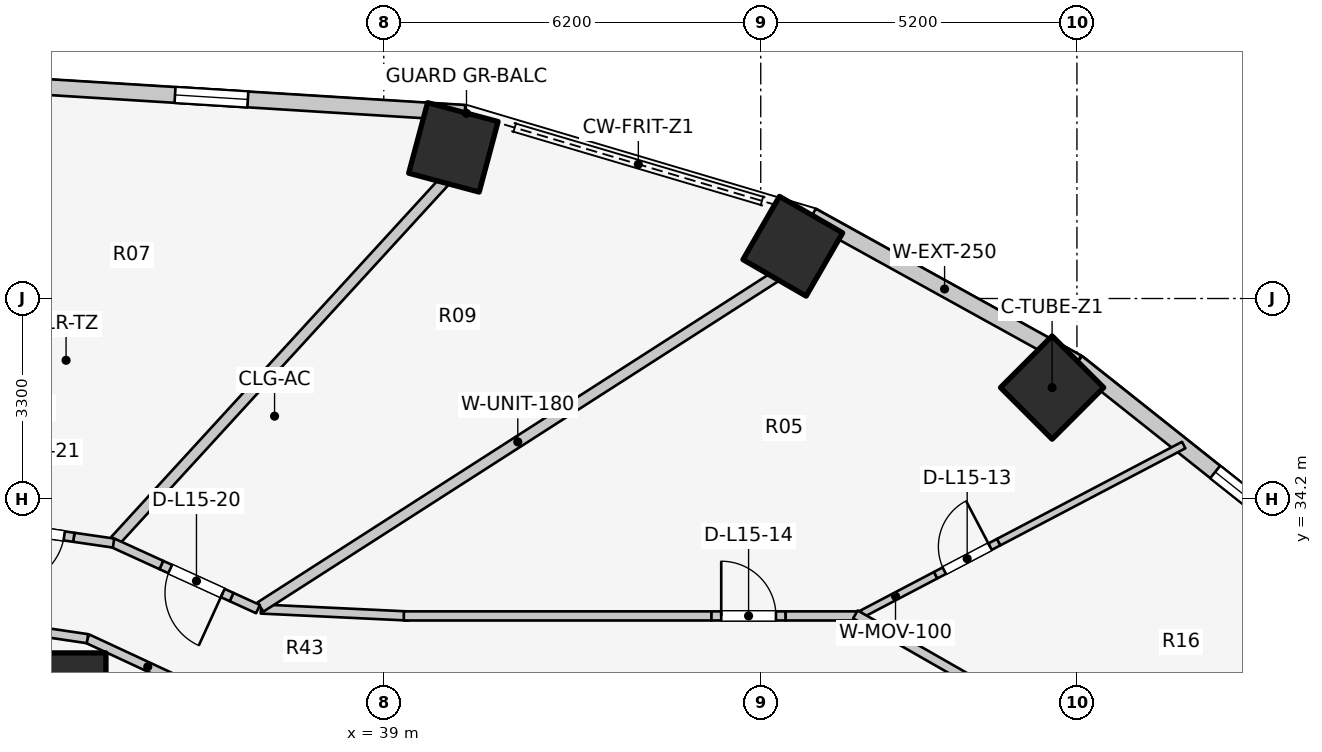
"""IFC4 building model, lengths in metres.
Left out: names, types, materials, properties, quantities, classifications, styles, units other than length and angle.
Written with IfcOpenShell. Run it as: python <this file> out.ifc"""

import sys

from ifc_helpers import new_model, si_unit, direction, frame, frame_2d, origin, origin_2d, place, context, subcontext, project, spatial, rectangle, extrude, element, fill, save


model = new_model("IFC4")
c1 = context("Model", 3, precision=1e-05, world=origin(), true_north=direction((0.0, 1.0)))
c2 = subcontext(c1, "Body", "Model", "MODEL_VIEW")
j1 = project(units=[si_unit("LENGTHUNIT", "METRE"), si_unit("PLANEANGLEUNIT", "RADIAN")], contexts=[c1])
p1 = place(None, origin())
s1 = spatial("IfcSite", under=j1, at=p1, CompositionType="ELEMENT")
p2 = place(p1, origin())
s2 = spatial("IfcBuilding", under=s1, at=p2, CompositionType="ELEMENT")
p3 = place(p2, frame((0.0, 0.0, 52.4)))
s3 = spatial("IfcBuildingStorey", under=s2, at=p3, CompositionType="ELEMENT", Elevation=52.4)
for number, where, z_axis, x_axis in (
    (1, (49.992, 36.035, 0.0), (0.0, 0.0, 1.0), (0.707, 0.707, 0.0)),
    (2, (45.727, 38.359, 0.0), (0.0, 0.0, 1.0), (0.5, 0.866, 0.0)),
):
    element("IfcColumn", number, at=place(p3, frame(where, z_axis=z_axis, x_axis=x_axis)), inside=s3, PredefinedType="COLUMN", context=c2, shape_type="SweptSolid", body=[
        extrude(rectangle(XDim=1.2, YDim=1.2, at=origin_2d()), origin(), (0.0, 0.0, 1.0), 3.1),
    ])
p4 = place(p3, frame((33.931, 31.172, 0.0), z_axis=(0.0, 0.0, 1.0), x_axis=(1.0, 0.0, 0.0)))
e3 = element("IfcColumn", 3, at=p4, inside=s3, PredefinedType="COLUMN", context=c2, shape_type="SweptSolid", body=[
    extrude(rectangle(XDim=1.0, YDim=1.0, at=origin_2d()), origin(), (0.0, 0.0, 1.0), 3.1),
])
p5 = place(p3, frame((40.145, 39.986, 0.0), z_axis=(0.0, 0.0, 1.0), x_axis=(0.258819045103, 0.965925826289, 0.0)))
e4 = element("IfcColumn", 4, at=p5, inside=s3, PredefinedType="COLUMN", context=c2, shape_type="SweptSolid", body=[
    extrude(rectangle(XDim=1.2, YDim=1.2, at=origin_2d()), origin(), (0.0, 0.0, 1.0), 3.1),
])
p6 = place(p3, frame((54.194, 33.441, 0.0), z_axis=(0.0, 0.0, 1.0), x_axis=(-0.783123133379, 0.621866672179, 0.0)))
e5 = element("IfcWall", 5, at=p6, inside=s3, PredefinedType="STANDARD", context=c2, shape_type="SweptSolid", body=[
    extrude(rectangle(XDim=4.839, YDim=0.26, at=frame_2d((2.419, 0.0))), origin(), (0.0, 0.0, 1.0), 1.22),
])
p7 = place(p6, frame((0.741, 0.0, 0.15)))
e6 = element("IfcOpeningElement", 6, at=p7, cuts=e5, PredefinedType="OPENING", context=c2, shape_type="SweptSolid", body=[
    extrude(rectangle(XDim=1.2, YDim=0.9, at=frame_2d((0.6, 0.45))), frame((0.0, 0.14, 0.0), z_axis=(0.0, -1.0, 0.0), x_axis=(1.0, 0.0, 0.0)), (0.0, 0.0, 1.0), 0.28),
])
p8 = place(p3, frame((50.405, 36.45, 0.0), z_axis=(0.0, 0.0, 1.0), x_axis=(-0.875137303239, 0.483874674352, 0.0)))
e7 = element("IfcWall", 7, at=p8, inside=s3, PredefinedType="STANDARD", context=c2, shape_type="SweptSolid", body=[
    extrude(rectangle(XDim=4.985, YDim=0.26, at=frame_2d((2.493, 0.0))), origin(), (0.0, 0.0, 1.0), 1.22),
])
p9 = place(p3, frame((40.332, 40.553, 0.0), z_axis=(0.0, 0.0, 1.0), x_axis=(-0.998090514779, 0.061768311519, 0.0)))
e8 = element("IfcWall", 8, at=p9, inside=s3, PredefinedType="STANDARD", context=c2, shape_type="SweptSolid", body=[
    extrude(rectangle(XDim=8.348, YDim=0.26, at=frame_2d((4.174, 0.0))), origin(), (0.0, 0.0, 1.0), 1.22),
])
p10 = place(p9, frame((3.574, 0.0, 0.15)))
e9 = element("IfcOpeningElement", 9, at=p10, cuts=e8, PredefinedType="OPENING", context=c2, shape_type="SweptSolid", body=[
    extrude(rectangle(XDim=1.2, YDim=0.9, at=frame_2d((0.6, 0.45))), frame((0.0, 0.14, 0.0), z_axis=(0.0, -1.0, 0.0), x_axis=(1.0, 0.0, 0.0)), (0.0, 0.0, 1.0), 0.28),
])
p11 = place(p3, frame((36.11, 30.985, 0.0), z_axis=(0.0, 0.0, 1.0), x_axis=(-0.906943449489, 0.421252393975, 0.0)))
e10 = element("IfcWall", 10, at=p11, inside=s3, PredefinedType="PARTITIONING", context=c2, shape_type="SweptSolid", body=[
    extrude(rectangle(XDim=2.186, YDim=0.15, at=frame_2d((1.093, 0.0))), origin(), (0.0, 0.0, 1.0), 1.957),
])
p12 = place(p3, frame((34.127, 31.906, 0.0), z_axis=(0.0, 0.0, 1.0), x_axis=(-0.989268584896, 0.146108408166, 0.0)))
e11 = element("IfcWall", 11, at=p12, inside=s3, PredefinedType="PARTITIONING", context=c2, shape_type="SweptSolid", body=[
    extrude(rectangle(XDim=2.151, YDim=0.15, at=frame_2d((1.075, 0.0))), origin(), (0.0, 0.0, 1.0), 1.957),
])
p13 = place(p3, frame((46.756, 32.257, 0.0), z_axis=(0.0, 0.0, 1.0), x_axis=(0.885552742751, 0.464538846391, 0.0)))
e12 = element("IfcWall", 12, at=p13, inside=s3, PredefinedType="MOVABLE", context=c2, shape_type="SweptSolid", body=[
    extrude(rectangle(XDim=1.492, YDim=0.12, at=frame_2d((0.746, 0.0))), origin(), (0.0, 0.0, 1.0), 2.575),
])
p14 = place(p3, frame((48.077, 32.95, 0.0), z_axis=(0.0, 0.0, 1.0), x_axis=(0.885533150024, 0.464576194191, 0.0)))
e13 = element("IfcWall", 13, at=p14, inside=s3, PredefinedType="MOVABLE", context=c2, shape_type="SweptSolid", body=[
    extrude(rectangle(XDim=1.17, YDim=0.12, at=frame_2d((0.585, 0.0))), origin(), (0.0, 0.0, 1.0), 2.11),
])
p15 = place(p14, frame((0.16, 0.0, 0.0)))
e14 = element("IfcOpeningElement", 14, at=p15, cuts=e13, PredefinedType="OPENING", context=c2, shape_type="SweptSolid", body=[
    extrude(rectangle(XDim=0.85, YDim=2.05, at=frame_2d((0.425, 1.025))), frame((0.0, 0.07, 0.0), z_axis=(0.0, -1.0, 0.0), x_axis=(1.0, 0.0, 0.0)), (0.0, 0.0, 1.0), 0.14),
])
p16 = place(p3, frame((49.113, 33.493, 0.0), z_axis=(0.0, 0.0, 1.0), x_axis=(0.885561599533, 0.464521962271, 0.0)))
e15 = element("IfcWall", 15, at=p16, inside=s3, PredefinedType="MOVABLE", context=c2, shape_type="SweptSolid", body=[
    extrude(rectangle(XDim=3.436, YDim=0.12, at=frame_2d((1.718, 0.0))), origin(), (0.0, 0.0, 1.0), 1.22),
])
p17 = place(p3, frame((36.98, 32.394, 0.0), z_axis=(0.0, 0.0, 1.0), x_axis=(0.998877427952, -0.047369651964, 0.0)))
e16 = element("IfcWall", 16, at=p17, inside=s3, PredefinedType="PARTITIONING", context=c2, shape_type="SweptSolid", body=[
    extrude(rectangle(XDim=2.433, YDim=0.15, at=frame_2d((1.216, 0.0))), origin(), (0.0, 0.0, 1.0), 1.957),
])
p18 = place(p3, frame((39.33, 32.28, 0.0), z_axis=(0.0, 0.0, 1.0), x_axis=(1.0, 0.0, 0.0)))
e17 = element("IfcWall", 17, at=p18, inside=s3, PredefinedType="PARTITIONING", context=c2, shape_type="SweptSolid", body=[
    extrude(rectangle(XDim=5.06, YDim=0.15, at=frame_2d((2.53, 0.0))), origin(), (0.0, 0.0, 1.0), 1.957),
])
p19 = place(p3, frame((44.39, 32.28, 0.0), z_axis=(0.0, 0.0, 1.0), x_axis=(1.0, 0.0, 0.0)))
e18 = element("IfcWall", 18, at=p19, inside=s3, PredefinedType="PARTITIONING", context=c2, shape_type="SweptSolid", body=[
    extrude(rectangle(XDim=1.22, YDim=0.15, at=frame_2d((0.61, 0.0))), origin(), (0.0, 0.0, 1.0), 2.575),
])
p20 = place(p19, frame((0.16, 0.0, 0.0)))
e19 = element("IfcOpeningElement", 19, at=p20, cuts=e18, PredefinedType="OPENING", context=c2, shape_type="SweptSolid", body=[
    extrude(rectangle(XDim=0.9, YDim=2.1, at=frame_2d((0.45, 1.05))), frame((0.0, 0.085, 0.0), z_axis=(0.0, -1.0, 0.0), x_axis=(1.0, 0.0, 0.0)), (0.0, 0.0, 1.0), 0.17),
])
p21 = place(p3, frame((45.61, 32.28, 0.0), z_axis=(0.0, 0.0, 1.0), x_axis=(1.0, 0.0, 0.0)))
e20 = element("IfcWall", 20, at=p21, inside=s3, PredefinedType="PARTITIONING", context=c2, shape_type="SweptSolid", body=[
    extrude(rectangle(XDim=1.24, YDim=0.15, at=frame_2d((0.62, 0.0))), origin(), (0.0, 0.0, 1.0), 2.575),
])
p22 = place(p3, frame((46.757, 32.305, 0.0), z_axis=(0.0, 0.0, 1.0), x_axis=(0.867991349648, -0.496579315857, 0.0)))
e21 = element("IfcWall", 21, at=p22, inside=s3, PredefinedType="PARTITIONING", context=c2, shape_type="SweptSolid", body=[
    extrude(rectangle(XDim=2.567, YDim=0.15, at=frame_2d((1.283, 0.0))), origin(), (0.0, 0.0, 1.0), 1.22),
])
p23 = place(p3, frame((36.971, 32.426, 0.0), z_axis=(0.0, 0.0, 1.0), x_axis=(0.841689919529, 0.5399611832, 0.0)))
e22 = element("IfcWall", 22, at=p23, inside=s3, PredefinedType="PARTITIONING", context=c2, shape_type="SweptSolid", body=[
    extrude(rectangle(XDim=10.058, YDim=0.18, at=frame_2d((5.029, 0.0))), origin(), (0.0, 0.0, 1.0), 1.957),
])
p24 = place(p3, frame((34.586, 33.521, 0.0), z_axis=(0.0, 0.0, 1.0), x_axis=(0.675465011224, 0.737392038615, 0.0)))
e23 = element("IfcWall", 23, at=p24, inside=s3, PredefinedType="PARTITIONING", context=c2, shape_type="SweptSolid", body=[
    extrude(rectangle(XDim=8.007, YDim=0.18, at=frame_2d((4.003, 0.0))), origin(), (0.0, 0.0, 1.0), 1.957),
])
p25 = place(p3, frame((36.931, 32.393, 0.0), z_axis=(0.0, 0.0, 1.0), x_axis=(-0.909645934478, 0.415384489224, 0.0)))
e24 = element("IfcWall", 24, at=p25, inside=s3, PredefinedType="PARTITIONING", context=c2, shape_type="SweptSolid", body=[
    extrude(rectangle(XDim=0.477, YDim=0.15, at=frame_2d((0.238, 0.0))), origin(), (0.0, 0.0, 1.0), 2.575),
])
p26 = place(p3, frame((36.497, 32.591, 0.0), z_axis=(0.0, 0.0, 1.0), x_axis=(-0.909812681416, 0.415019137794, 0.0)))
e25 = element("IfcWall", 25, at=p26, inside=s3, PredefinedType="PARTITIONING", context=c2, shape_type="SweptSolid", body=[
    extrude(rectangle(XDim=1.27, YDim=0.15, at=frame_2d((0.635, 0.0))), origin(), (0.0, 0.0, 1.0), 2.16),
])
p27 = place(p26, frame((0.16, 0.0, 0.0)))
e26 = element("IfcOpeningElement", 26, at=p27, cuts=e25, PredefinedType="OPENING", context=c2, shape_type="SweptSolid", body=[
    extrude(rectangle(XDim=0.95, YDim=2.1, at=frame_2d((0.475, 1.05))), frame((0.0, 0.085, 0.0), z_axis=(0.0, -1.0, 0.0), x_axis=(1.0, 0.0, 0.0)), (0.0, 0.0, 1.0), 0.17),
])
p28 = place(p3, frame((35.342, 33.118, 0.0), z_axis=(0.0, 0.0, 1.0), x_axis=(-0.909708546861, 0.415247347696, 0.0)))
e27 = element("IfcWall", 27, at=p28, inside=s3, PredefinedType="PARTITIONING", context=c2, shape_type="SweptSolid", body=[
    extrude(rectangle(XDim=0.878, YDim=0.15, at=frame_2d((0.439, 0.0))), origin(), (0.0, 0.0, 1.0), 1.957),
])
p29 = place(p3, frame((34.556, 33.478, 0.0), z_axis=(0.0, 0.0, 1.0), x_axis=(-0.989643848527, 0.143544603076, 0.0)))
e28 = element("IfcWall", 28, at=p29, inside=s3, PredefinedType="PARTITIONING", context=c2, shape_type="SweptSolid", body=[
    extrude(rectangle(XDim=0.66, YDim=0.15, at=frame_2d((0.33, 0.0))), origin(), (0.0, 0.0, 1.0), 2.575),
])
p30 = place(p3, frame((33.903, 33.573, 0.0), z_axis=(0.0, 0.0, 1.0), x_axis=(-0.989635669595, 0.143600980029, 0.0)))
e29 = element("IfcWall", 29, at=p30, inside=s3, PredefinedType="PARTITIONING", context=c2, shape_type="SweptSolid", body=[
    extrude(rectangle(XDim=1.27, YDim=0.15, at=frame_2d((0.635, 0.0))), origin(), (0.0, 0.0, 1.0), 2.575),
])
p31 = place(p30, frame((0.16, 0.0, 0.0)))
e30 = element("IfcOpeningElement", 30, at=p31, cuts=e29, PredefinedType="OPENING", context=c2, shape_type="SweptSolid", body=[
    extrude(rectangle(XDim=0.95, YDim=2.1, at=frame_2d((0.475, 1.05))), frame((0.0, 0.085, 0.0), z_axis=(0.0, -1.0, 0.0), x_axis=(1.0, 0.0, 0.0)), (0.0, 0.0, 1.0), 0.17),
])
p32 = place(p7, origin())
e31 = element("IfcWindow", 31, at=p32, inside=s3, PartitioningType="SINGLE_PANEL", PredefinedType="WINDOW", context=c2, shape_type="SweptSolid", body=[
    extrude(rectangle(XDim=1.2, YDim=0.9, at=frame_2d((0.6, 0.45))), frame((0.0, 0.03, 0.0), z_axis=(0.0, -1.0, 0.0), x_axis=(1.0, 0.0, 0.0)), (0.0, 0.0, 1.0), 0.06),
])
fill(e6, e31)
p33 = place(p10, origin())
e32 = element("IfcWindow", 32, at=p33, inside=s3, PartitioningType="SINGLE_PANEL", PredefinedType="WINDOW", context=c2, shape_type="SweptSolid", body=[
    extrude(rectangle(XDim=1.2, YDim=0.9, at=frame_2d((0.6, 0.45))), frame((0.0, 0.03, 0.0), z_axis=(0.0, -1.0, 0.0), x_axis=(1.0, 0.0, 0.0)), (0.0, 0.0, 1.0), 0.06),
])
fill(e9, e32)
p34 = place(p15, origin())
e33 = element("IfcDoor", 33, at=p34, inside=s3, OperationType="SINGLE_SWING_RIGHT", PredefinedType="DOOR", context=c2, shape_type="SweptSolid", body=[
    extrude(rectangle(XDim=0.85, YDim=2.05, at=frame_2d((0.425, 1.025))), frame((0.0, 0.025, 0.0), z_axis=(0.0, -1.0, 0.0), x_axis=(1.0, 0.0, 0.0)), (0.0, 0.0, 1.0), 0.05),
])
fill(e14, e33)
p35 = place(p20, origin())
e34 = element("IfcDoor", 34, at=p35, inside=s3, OperationType="SINGLE_SWING_LEFT", PredefinedType="DOOR", context=c2, shape_type="SweptSolid", body=[
    extrude(rectangle(XDim=0.9, YDim=2.1, at=frame_2d((0.45, 1.05))), frame((0.0, 0.025, 0.0), z_axis=(0.0, -1.0, 0.0), x_axis=(1.0, 0.0, 0.0)), (0.0, 0.0, 1.0), 0.05),
])
fill(e19, e34)
p36 = place(p27, origin())
e35 = element("IfcDoor", 35, at=p36, inside=s3, OperationType="SINGLE_SWING_LEFT", PredefinedType="DOOR", context=c2, shape_type="SweptSolid", body=[
    extrude(rectangle(XDim=0.95, YDim=2.1, at=frame_2d((0.475, 1.05))), frame((0.0, 0.025, 0.0), z_axis=(0.0, -1.0, 0.0), x_axis=(1.0, 0.0, 0.0)), (0.0, 0.0, 1.0), 0.05),
])
fill(e26, e35)
p37 = place(p31, origin())
e36 = element("IfcDoor", 36, at=p37, inside=s3, OperationType="SINGLE_SWING_RIGHT", PredefinedType="DOOR", context=c2, shape_type="SweptSolid", body=[
    extrude(rectangle(XDim=0.95, YDim=2.1, at=frame_2d((0.475, 1.05))), frame((0.0, 0.025, 0.0), z_axis=(0.0, -1.0, 0.0), x_axis=(1.0, 0.0, 0.0)), (0.0, 0.0, 1.0), 0.05),
])
fill(e30, e36)
save(model, sys.argv[1])
